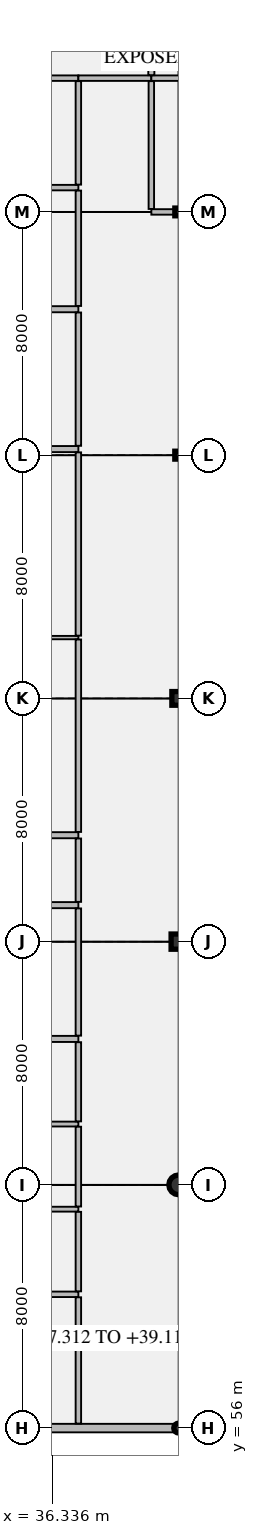
"""IFC4 building model, lengths in metres.
Left out: names, types, materials, properties, quantities, classifications, styles, units other than length and angle.
Written with IfcOpenShell. Run it as: python <this file> out.ifc"""

import sys

from ifc_helpers import new_model, si_unit, direction, frame, frame_2d, origin, origin_2d, place, context, subcontext, project, spatial, rectangle, hollow_rectangle, circle, hollow_circle, i_section, extrude, element, fill, save


model = new_model("IFC4")
c1 = context("Model", 3, precision=1e-05, world=origin(), true_north=direction((0.0, 1.0)))
c2 = subcontext(c1, "Body", "Model", "MODEL_VIEW")
j1 = project(units=[si_unit("LENGTHUNIT", "METRE"), si_unit("PLANEANGLEUNIT", "RADIAN")], contexts=[c1])
p1 = place(None, origin())
s1 = spatial("IfcSite", under=j1, at=p1, CompositionType="ELEMENT")
p2 = place(p1, origin())
s2 = spatial("IfcBuilding", under=s1, at=p2, CompositionType="ELEMENT")
p3 = place(p2, frame((0.0, 0.0, 33.3)))
s3 = spatial("IfcBuildingStorey", under=s2, at=p3, CompositionType="ELEMENT", Elevation=33.3)
p4 = place(p3, frame((40.5, 56.0, 0.0), z_axis=(0.0, 0.0, 1.0), x_axis=(1.0, 0.0, 0.0)))
e1 = element("IfcColumn", 1, at=p4, inside=s3, PredefinedType="COLUMN", context=c2, shape_type="SweptSolid", body=[
    extrude(hollow_circle(Radius=0.162, WallThickness=0.013, at=origin_2d()), origin(), (0.0, 0.0, 1.0), 3.98),
])
p5 = place(p3, frame((40.5, 64.0, 0.0), z_axis=(0.0, 0.0, 1.0), x_axis=(1.0, 0.0, 0.0)))
e2 = element("IfcColumn", 2, at=p5, inside=s3, PredefinedType="COLUMN", context=c2, shape_type="SweptSolid", body=[
    extrude(circle(Radius=0.325, at=origin_2d()), origin(), (0.0, 0.0, 1.0), 3.98),
])
p6 = place(p3, frame((40.5, 72.0, 0.0), z_axis=(0.0, 0.0, 1.0), x_axis=(1.0, 0.0, 0.0)))
e3 = element("IfcColumn", 3, at=p6, inside=s3, PredefinedType="COLUMN", context=c2, shape_type="SweptSolid", body=[
    extrude(rectangle(XDim=0.5, YDim=0.5, at=origin_2d()), origin(), (0.0, 0.0, 1.0), 3.98),
])
p7 = place(p3, frame((40.5, 80.0, 0.0), z_axis=(0.0, 0.0, 1.0), x_axis=(1.0, 0.0, 0.0)))
e4 = element("IfcColumn", 4, at=p7, inside=s3, PredefinedType="COLUMN", context=c2, shape_type="SweptSolid", body=[
    extrude(rectangle(XDim=0.45, YDim=0.45, at=origin_2d()), origin(), (0.0, 0.0, 1.0), 3.98),
])
p8 = place(p3, frame((40.5, 88.0, 0.0), z_axis=(0.0, 0.0, 1.0), x_axis=(1.0, 0.0, 0.0)))
e5 = element("IfcColumn", 5, at=p8, inside=s3, PredefinedType="COLUMN", context=c2, shape_type="SweptSolid", body=[
    extrude(i_section(OverallWidth=0.256, OverallDepth=0.26, WebThickness=0.011, FlangeThickness=0.017, FilletRadius=0.013, at=origin_2d()), origin(), (0.0, 0.0, 1.0), 3.98),
])
p9 = place(p3, frame((40.5, 96.0, 0.0), z_axis=(0.0, 0.0, 1.0), x_axis=(1.0, 0.0, 0.0)))
e6 = element("IfcColumn", 6, at=p9, inside=s3, PredefinedType="COLUMN", context=c2, shape_type="SweptSolid", body=[
    extrude(hollow_rectangle(XDim=0.254, YDim=0.254, WallThickness=0.013, InnerFilletRadius=0.013, OuterFilletRadius=0.025, at=origin_2d()), origin(), (0.0, 0.0, 1.0), 3.98),
])
p10 = place(p3, frame((28.26, 56.0, 0.0), z_axis=(0.0, 0.0, 1.0), x_axis=(1.0, 0.0, 0.0)))
e7 = element("IfcWall", 7, at=p10, inside=s3, PredefinedType="SOLIDWALL", context=c2, shape_type="SweptSolid", body=[
    extrude(rectangle(XDim=12.06, YDim=0.28, at=frame_2d((6.03, 0.0))), origin(), (0.0, 0.0, 1.0), 3.655),
])
for number, where, z_axis, x_axis in (
    (8, (30.249, 73.2, 0.0), (0.0, 0.0, 1.0), (1.0, 0.0, 0.0)),
    (9, (30.249, 75.5, 0.0), (0.0, 0.0, 1.0), (1.0, 0.0, 0.0)),
):
    element("IfcWall", number, at=place(p3, frame(where, z_axis=z_axis, x_axis=x_axis)), inside=s3, PredefinedType="PARTITIONING", context=c2, shape_type="SweptSolid", body=[
        extrude(rectangle(XDim=6.951, YDim=0.2, at=frame_2d((3.475, 0.0))), origin(), (0.0, 0.0, 1.0), 3.98),
    ])
p11 = place(p3, frame((30.249, 82.0, 0.0), z_axis=(0.0, 0.0, 1.0), x_axis=(1.0, 0.0, 0.0)))
e10 = element("IfcWall", 10, at=p11, inside=s3, PredefinedType="PARTITIONING", context=c2, shape_type="SweptSolid", body=[
    extrude(rectangle(XDim=6.951, YDim=0.11, at=frame_2d((3.475, 0.0))), origin(), (0.0, 0.0, 1.0), 3.98),
])
p12 = place(p3, frame((32.658, 88.2, 0.0), z_axis=(0.0, 0.0, 1.0), x_axis=(1.0, 0.0, 0.0)))
e11 = element("IfcWall", 11, at=p12, inside=s3, PredefinedType="PARTITIONING", context=c2, shape_type="SweptSolid", body=[
    extrude(rectangle(XDim=4.542, YDim=0.2, at=frame_2d((2.271, 0.0))), origin(), (0.0, 0.0, 1.0), 3.655),
])
p13 = place(p3, frame((30.249, 92.8, 0.0), z_axis=(0.0, 0.0, 1.0), x_axis=(1.0, 0.0, 0.0)))
e12 = element("IfcWall", 12, at=p13, inside=s3, PredefinedType="PARTITIONING", context=c2, shape_type="SweptSolid", body=[
    extrude(rectangle(XDim=6.951, YDim=0.2, at=frame_2d((3.475, 0.0))), origin(), (0.0, 0.0, 1.0), 3.98),
])
p14 = place(p3, frame((29.2, 96.8, 0.0), z_axis=(0.0, 0.0, 1.0), x_axis=(1.0, 0.0, 0.0)))
e13 = element("IfcWall", 13, at=p14, inside=s3, PredefinedType="PARTITIONING", context=c2, shape_type="SweptSolid", body=[
    extrude(rectangle(XDim=8.0, YDim=0.18, at=frame_2d((4.0, 0.0))), origin(), (0.0, 0.0, 1.0), 3.98),
])
p15 = place(p3, frame((29.425, 100.4, 0.0), z_axis=(0.0, 0.0, 1.0), x_axis=(1.0, 0.0, 0.0)))
e14 = element("IfcWall", 14, at=p15, inside=s3, PredefinedType="PARTITIONING", context=c2, shape_type="SweptSolid", body=[
    extrude(rectangle(XDim=7.775, YDim=0.18, at=frame_2d((3.887, 0.0))), origin(), (0.0, 0.0, 1.0), 3.98),
])
p16 = place(p15, frame((3.387, 0.0, 0.0)))
e15 = element("IfcOpeningElement", 15, at=p16, cuts=e14, PredefinedType="OPENING", context=c2, shape_type="SweptSolid", body=[
    extrude(rectangle(XDim=1.0, YDim=2.2, at=frame_2d((0.5, 1.1))), frame((0.0, 0.1, 0.0), z_axis=(0.0, -1.0, 0.0), x_axis=(1.0, 0.0, 0.0)), (0.0, 0.0, 1.0), 0.2),
])
p17 = place(p3, frame((32.025, 60.4, 0.0), z_axis=(0.0, 0.0, 1.0), x_axis=(1.0, 0.0, 0.0)))
e16 = element("IfcWall", 16, at=p17, inside=s3, PredefinedType="PARTITIONING", context=c2, shape_type="SweptSolid", body=[
    extrude(rectangle(XDim=5.175, YDim=0.18, at=frame_2d((2.587, 0.0))), origin(), (0.0, 0.0, 1.0), 3.98),
])
for number, where, z_axis, x_axis in (
    (17, (32.033, 63.2, 0.0), (0.0, 0.0, 1.0), (1.0, 0.0, 0.0)),
    (18, (32.033, 66.0, 0.0), (0.0, 0.0, 1.0), (1.0, 0.0, 0.0)),
):
    element("IfcWall", number, at=place(p3, frame(where, z_axis=z_axis, x_axis=x_axis)), inside=s3, PredefinedType="PARTITIONING", context=c2, shape_type="SweptSolid", body=[
        extrude(rectangle(XDim=5.167, YDim=0.16, at=frame_2d((2.583, 0.0))), origin(), (0.0, 0.0, 1.0), 3.98),
    ])
p18 = place(p3, frame((32.025, 68.8, 0.0), z_axis=(0.0, 0.0, 1.0), x_axis=(1.0, 0.0, 0.0)))
e19 = element("IfcWall", 19, at=p18, inside=s3, PredefinedType="PARTITIONING", context=c2, shape_type="SweptSolid", body=[
    extrude(rectangle(XDim=5.175, YDim=0.2, at=frame_2d((2.587, 0.0))), origin(), (0.0, 0.0, 1.0), 3.98),
])
p19 = place(p3, frame((37.2, 100.4, 0.0), z_axis=(0.0, 0.0, 1.0), x_axis=(1.0, 0.0, 0.0)))
e20 = element("IfcWall", 20, at=p19, inside=s3, PredefinedType="PARTITIONING", context=c2, shape_type="SweptSolid", body=[
    extrude(rectangle(XDim=2.4, YDim=0.18, at=frame_2d((1.2, 0.0))), origin(), (0.0, 0.0, 1.0), 3.98),
])
p20 = place(p3, frame((39.6, 96.0, 0.0), z_axis=(0.0, 0.0, 1.0), x_axis=(1.0, 0.0, 0.0)))
e21 = element("IfcWall", 21, at=p20, inside=s3, PredefinedType="PARTITIONING", context=c2, shape_type="SweptSolid", body=[
    extrude(rectangle(XDim=0.765, YDim=0.18, at=frame_2d((0.382, 0.0))), origin(), (0.0, 0.0, 1.0), 3.655),
])
p21 = place(p3, frame((39.6, 100.4, 0.0), z_axis=(0.0, 0.0, 1.0), x_axis=(1.0, 0.0, 0.0)))
e22 = element("IfcWall", 22, at=p21, inside=s3, PredefinedType="PARTITIONING", context=c2, shape_type="SweptSolid", body=[
    extrude(rectangle(XDim=4.0, YDim=0.18, at=frame_2d((2.0, 0.0))), origin(), (0.0, 0.0, 1.0), 3.98),
])
p22 = place(p3, frame((37.2, 56.148, 0.0), z_axis=(0.0, 0.0, 1.0), x_axis=(0.0, 1.0, 0.0)))
e23 = element("IfcWall", 23, at=p22, inside=s3, PredefinedType="PARTITIONING", context=c2, shape_type="SweptSolid", body=[
    extrude(rectangle(XDim=4.154, YDim=0.18, at=frame_2d((2.077, 0.0))), origin(), (0.0, 0.0, 1.0), 3.98),
])
p23 = place(p22, frame((1.527, 0.0, 0.0)))
e24 = element("IfcOpeningElement", 24, at=p23, cuts=e23, PredefinedType="OPENING", context=c2, shape_type="SweptSolid", body=[
    extrude(rectangle(XDim=1.1, YDim=2.2, at=frame_2d((0.55, 1.1))), frame((0.0, 0.1, 0.0), z_axis=(0.0, -1.0, 0.0), x_axis=(1.0, 0.0, 0.0)), (0.0, 0.0, 1.0), 0.2),
])
p24 = place(p3, frame((37.2, 60.498, 0.0), z_axis=(0.0, 0.0, 1.0), x_axis=(0.0, 1.0, 0.0)))
e25 = element("IfcWall", 25, at=p24, inside=s3, PredefinedType="PARTITIONING", context=c2, shape_type="SweptSolid", body=[
    extrude(rectangle(XDim=2.614, YDim=0.18, at=frame_2d((1.307, 0.0))), origin(), (0.0, 0.0, 1.0), 3.98),
])
p25 = place(p24, frame((0.832, 0.0, 0.0)))
e26 = element("IfcOpeningElement", 26, at=p25, cuts=e25, PredefinedType="OPENING", context=c2, shape_type="SweptSolid", body=[
    extrude(rectangle(XDim=0.95, YDim=2.1, at=frame_2d((0.475, 1.05))), frame((0.0, 0.1, 0.0), z_axis=(0.0, -1.0, 0.0), x_axis=(1.0, 0.0, 0.0)), (0.0, 0.0, 1.0), 0.2),
])
p26 = place(p3, frame((37.2, 63.288, 0.0), z_axis=(0.0, 0.0, 1.0), x_axis=(0.0, 1.0, 0.0)))
e27 = element("IfcWall", 27, at=p26, inside=s3, PredefinedType="PARTITIONING", context=c2, shape_type="SweptSolid", body=[
    extrude(rectangle(XDim=2.624, YDim=0.18, at=frame_2d((1.312, 0.0))), origin(), (0.0, 0.0, 1.0), 3.98),
])
p27 = place(p26, frame((0.837, 0.0, 0.0)))
e28 = element("IfcOpeningElement", 28, at=p27, cuts=e27, PredefinedType="OPENING", context=c2, shape_type="SweptSolid", body=[
    extrude(rectangle(XDim=0.95, YDim=2.1, at=frame_2d((0.475, 1.05))), frame((0.0, 0.1, 0.0), z_axis=(0.0, -1.0, 0.0), x_axis=(1.0, 0.0, 0.0)), (0.0, 0.0, 1.0), 0.2),
])
p28 = place(p3, frame((37.2, 66.088, 0.0), z_axis=(0.0, 0.0, 1.0), x_axis=(0.0, 1.0, 0.0)))
e29 = element("IfcWall", 29, at=p28, inside=s3, PredefinedType="PARTITIONING", context=c2, shape_type="SweptSolid", body=[
    extrude(rectangle(XDim=2.604, YDim=0.18, at=frame_2d((1.302, 0.0))), origin(), (0.0, 0.0, 1.0), 3.98),
])
p29 = place(p28, frame((0.802, 0.0, 0.0)))
e30 = element("IfcOpeningElement", 30, at=p29, cuts=e29, PredefinedType="OPENING", context=c2, shape_type="SweptSolid", body=[
    extrude(rectangle(XDim=1.0, YDim=2.15, at=frame_2d((0.5, 1.075))), frame((0.0, 0.1, 0.0), z_axis=(0.0, -1.0, 0.0), x_axis=(1.0, 0.0, 0.0)), (0.0, 0.0, 1.0), 0.2),
])
p30 = place(p3, frame((37.2, 68.908, 0.0), z_axis=(0.0, 0.0, 1.0), x_axis=(0.0, 1.0, 0.0)))
e31 = element("IfcWall", 31, at=p30, inside=s3, PredefinedType="PARTITIONING", context=c2, shape_type="SweptSolid", body=[
    extrude(rectangle(XDim=4.184, YDim=0.18, at=frame_2d((2.092, 0.0))), origin(), (0.0, 0.0, 1.0), 3.98),
])
p31 = place(p30, frame((1.542, 0.0, 0.0)))
e32 = element("IfcOpeningElement", 32, at=p31, cuts=e31, PredefinedType="OPENING", context=c2, shape_type="SweptSolid", body=[
    extrude(rectangle(XDim=1.1, YDim=2.2, at=frame_2d((0.55, 1.1))), frame((0.0, 0.1, 0.0), z_axis=(0.0, -1.0, 0.0), x_axis=(1.0, 0.0, 0.0)), (0.0, 0.0, 1.0), 0.2),
])
p32 = place(p3, frame((37.2, 73.308, 0.0), z_axis=(0.0, 0.0, 1.0), x_axis=(0.0, 1.0, 0.0)))
e33 = element("IfcWall", 33, at=p32, inside=s3, PredefinedType="PARTITIONING", context=c2, shape_type="SweptSolid", body=[
    extrude(rectangle(XDim=2.084, YDim=0.18, at=frame_2d((1.042, 0.0))), origin(), (0.0, 0.0, 1.0), 3.98),
])
p33 = place(p32, frame((0.492, 0.0, 0.0)))
e34 = element("IfcOpeningElement", 34, at=p33, cuts=e33, PredefinedType="OPENING", context=c2, shape_type="SweptSolid", body=[
    extrude(rectangle(XDim=1.1, YDim=2.2, at=frame_2d((0.55, 1.1))), frame((0.0, 0.1, 0.0), z_axis=(0.0, -1.0, 0.0), x_axis=(1.0, 0.0, 0.0)), (0.0, 0.0, 1.0), 0.2),
])
p34 = place(p3, frame((37.2, 75.608, 0.0), z_axis=(0.0, 0.0, 1.0), x_axis=(0.0, 1.0, 0.0)))
e35 = element("IfcWall", 35, at=p34, inside=s3, PredefinedType="PARTITIONING", context=c2, shape_type="SweptSolid", body=[
    extrude(rectangle(XDim=6.329, YDim=0.18, at=frame_2d((3.165, 0.0))), origin(), (0.0, 0.0, 1.0), 3.98),
])
p35 = place(p34, frame((2.665, 0.0, 0.0)))
e36 = element("IfcOpeningElement", 36, at=p35, cuts=e35, PredefinedType="OPENING", context=c2, shape_type="SweptSolid", body=[
    extrude(rectangle(XDim=1.0, YDim=2.2, at=frame_2d((0.5, 1.1))), frame((0.0, 0.1, 0.0), z_axis=(0.0, -1.0, 0.0), x_axis=(1.0, 0.0, 0.0)), (0.0, 0.0, 1.0), 0.2),
])
p36 = place(p3, frame((37.2, 82.063, 0.0), z_axis=(0.0, 0.0, 1.0), x_axis=(0.0, 1.0, 0.0)))
e37 = element("IfcWall", 37, at=p36, inside=s3, PredefinedType="PARTITIONING", context=c2, shape_type="SweptSolid", body=[
    extrude(rectangle(XDim=6.029, YDim=0.18, at=frame_2d((3.015, 0.0))), origin(), (0.0, 0.0, 1.0), 3.98),
])
p37 = place(p36, frame((2.514, 0.0, 0.0)))
e38 = element("IfcOpeningElement", 38, at=p37, cuts=e37, PredefinedType="OPENING", context=c2, shape_type="SweptSolid", body=[
    extrude(rectangle(XDim=1.0, YDim=2.2, at=frame_2d((0.5, 1.1))), frame((0.0, 0.1, 0.0), z_axis=(0.0, -1.0, 0.0), x_axis=(1.0, 0.0, 0.0)), (0.0, 0.0, 1.0), 0.2),
])
p38 = place(p3, frame((37.2, 88.308, 0.0), z_axis=(0.0, 0.0, 1.0), x_axis=(0.0, 1.0, 0.0)))
e39 = element("IfcWall", 39, at=p38, inside=s3, PredefinedType="PARTITIONING", context=c2, shape_type="SweptSolid", body=[
    extrude(rectangle(XDim=4.384, YDim=0.18, at=frame_2d((2.192, 0.0))), origin(), (0.0, 0.0, 1.0), 3.98),
])
p39 = place(p38, frame((1.642, 0.0, 0.0)))
e40 = element("IfcOpeningElement", 40, at=p39, cuts=e39, PredefinedType="OPENING", context=c2, shape_type="SweptSolid", body=[
    extrude(rectangle(XDim=1.1, YDim=2.2, at=frame_2d((0.55, 1.1))), frame((0.0, 0.1, 0.0), z_axis=(0.0, -1.0, 0.0), x_axis=(1.0, 0.0, 0.0)), (0.0, 0.0, 1.0), 0.2),
])
p40 = place(p3, frame((37.2, 92.908, 0.0), z_axis=(0.0, 0.0, 1.0), x_axis=(0.0, 1.0, 0.0)))
e41 = element("IfcWall", 41, at=p40, inside=s3, PredefinedType="PARTITIONING", context=c2, shape_type="SweptSolid", body=[
    extrude(rectangle(XDim=3.794, YDim=0.18, at=frame_2d((1.897, 0.0))), origin(), (0.0, 0.0, 1.0), 3.98),
])
p41 = place(p40, frame((1.397, 0.0, 0.0)))
e42 = element("IfcOpeningElement", 42, at=p41, cuts=e41, PredefinedType="OPENING", context=c2, shape_type="SweptSolid", body=[
    extrude(rectangle(XDim=1.0, YDim=2.2, at=frame_2d((0.5, 1.1))), frame((0.0, 0.1, 0.0), z_axis=(0.0, -1.0, 0.0), x_axis=(1.0, 0.0, 0.0)), (0.0, 0.0, 1.0), 0.2),
])
p42 = place(p3, frame((37.2, 96.898, 0.0), z_axis=(0.0, 0.0, 1.0), x_axis=(0.0, 1.0, 0.0)))
e43 = element("IfcWall", 43, at=p42, inside=s3, PredefinedType="PARTITIONING", context=c2, shape_type="SweptSolid", body=[
    extrude(rectangle(XDim=3.404, YDim=0.18, at=frame_2d((1.702, 0.0))), origin(), (0.0, 0.0, 1.0), 3.98),
])
p43 = place(p42, frame((1.152, 0.0, 0.0)))
e44 = element("IfcOpeningElement", 44, at=p43, cuts=e43, PredefinedType="OPENING", context=c2, shape_type="SweptSolid", body=[
    extrude(rectangle(XDim=1.1, YDim=2.2, at=frame_2d((0.55, 1.1))), frame((0.0, 0.1, 0.0), z_axis=(0.0, -1.0, 0.0), x_axis=(1.0, 0.0, 0.0)), (0.0, 0.0, 1.0), 0.2),
])
p44 = place(p3, frame((39.6, 96.098, 0.0), z_axis=(0.0, 0.0, 1.0), x_axis=(0.0, 1.0, 0.0)))
e45 = element("IfcWall", 45, at=p44, inside=s3, PredefinedType="PARTITIONING", context=c2, shape_type="SweptSolid", body=[
    extrude(rectangle(XDim=4.204, YDim=0.18, at=frame_2d((2.102, 0.0))), origin(), (0.0, 0.0, 1.0), 3.98),
])
p45 = place(p44, frame((1.552, 0.0, 0.0)))
e46 = element("IfcOpeningElement", 46, at=p45, cuts=e45, PredefinedType="OPENING", context=c2, shape_type="SweptSolid", body=[
    extrude(rectangle(XDim=1.1, YDim=2.2, at=frame_2d((0.55, 1.1))), frame((0.0, 0.1, 0.0), z_axis=(0.0, -1.0, 0.0), x_axis=(1.0, 0.0, 0.0)), (0.0, 0.0, 1.0), 0.2),
])
p46 = place(p3, frame((39.6, 100.498, 0.0), z_axis=(0.0, 0.0, 1.0), x_axis=(0.0, 1.0, 0.0)))
e47 = element("IfcWall", 47, at=p46, inside=s3, PredefinedType="PARTITIONING", context=c2, shape_type="SweptSolid", body=[
    extrude(rectangle(XDim=8.204, YDim=0.2, at=frame_2d((4.102, 0.0))), origin(), (0.0, 0.0, 1.0), 3.98),
])
p47 = place(p23, origin())
e48 = element("IfcDoor", 48, at=p47, inside=s3, OperationType="SINGLE_SWING_RIGHT", PredefinedType="DOOR", context=c2, shape_type="SweptSolid", body=[
    extrude(rectangle(XDim=1.1, YDim=2.2, at=frame_2d((0.55, 1.1))), frame((0.0, 0.025, 0.0), z_axis=(0.0, -1.0, 0.0), x_axis=(1.0, 0.0, 0.0)), (0.0, 0.0, 1.0), 0.05),
])
fill(e24, e48)
p48 = place(p25, origin())
e49 = element("IfcDoor", 49, at=p48, inside=s3, OperationType="SINGLE_SWING_LEFT", PredefinedType="DOOR", context=c2, shape_type="SweptSolid", body=[
    extrude(rectangle(XDim=0.95, YDim=2.1, at=frame_2d((0.475, 1.05))), frame((0.0, 0.025, 0.0), z_axis=(0.0, -1.0, 0.0), x_axis=(1.0, 0.0, 0.0)), (0.0, 0.0, 1.0), 0.05),
])
fill(e26, e49)
p49 = place(p27, origin())
e50 = element("IfcDoor", 50, at=p49, inside=s3, OperationType="SINGLE_SWING_RIGHT", PredefinedType="DOOR", context=c2, shape_type="SweptSolid", body=[
    extrude(rectangle(XDim=0.95, YDim=2.1, at=frame_2d((0.475, 1.05))), frame((0.0, 0.025, 0.0), z_axis=(0.0, -1.0, 0.0), x_axis=(1.0, 0.0, 0.0)), (0.0, 0.0, 1.0), 0.05),
])
fill(e28, e50)
p50 = place(p29, origin())
e51 = element("IfcDoor", 51, at=p50, inside=s3, OperationType="SINGLE_SWING_LEFT", PredefinedType="DOOR", context=c2, shape_type="SweptSolid", body=[
    extrude(rectangle(XDim=1.0, YDim=2.15, at=frame_2d((0.5, 1.075))), frame((0.0, 0.025, 0.0), z_axis=(0.0, -1.0, 0.0), x_axis=(1.0, 0.0, 0.0)), (0.0, 0.0, 1.0), 0.05),
])
fill(e30, e51)
p51 = place(p31, origin())
e52 = element("IfcDoor", 52, at=p51, inside=s3, OperationType="SINGLE_SWING_RIGHT", PredefinedType="DOOR", context=c2, shape_type="SweptSolid", body=[
    extrude(rectangle(XDim=1.1, YDim=2.2, at=frame_2d((0.55, 1.1))), frame((0.0, 0.025, 0.0), z_axis=(0.0, -1.0, 0.0), x_axis=(1.0, 0.0, 0.0)), (0.0, 0.0, 1.0), 0.05),
])
fill(e32, e52)
p52 = place(p33, origin())
e53 = element("IfcDoor", 53, at=p52, inside=s3, OperationType="SINGLE_SWING_LEFT", PredefinedType="DOOR", context=c2, shape_type="SweptSolid", body=[
    extrude(rectangle(XDim=1.1, YDim=2.2, at=frame_2d((0.55, 1.1))), frame((0.0, 0.025, 0.0), z_axis=(0.0, -1.0, 0.0), x_axis=(1.0, 0.0, 0.0)), (0.0, 0.0, 1.0), 0.05),
])
fill(e34, e53)
p53 = place(p35, origin())
e54 = element("IfcDoor", 54, at=p53, inside=s3, OperationType="SINGLE_SWING_RIGHT", PredefinedType="DOOR", context=c2, shape_type="SweptSolid", body=[
    extrude(rectangle(XDim=1.0, YDim=2.2, at=frame_2d((0.5, 1.1))), frame((0.0, 0.025, 0.0), z_axis=(0.0, -1.0, 0.0), x_axis=(1.0, 0.0, 0.0)), (0.0, 0.0, 1.0), 0.05),
])
fill(e36, e54)
p54 = place(p37, origin())
e55 = element("IfcDoor", 55, at=p54, inside=s3, OperationType="SINGLE_SWING_LEFT", PredefinedType="DOOR", context=c2, shape_type="SweptSolid", body=[
    extrude(rectangle(XDim=1.0, YDim=2.2, at=frame_2d((0.5, 1.1))), frame((0.0, 0.025, 0.0), z_axis=(0.0, -1.0, 0.0), x_axis=(1.0, 0.0, 0.0)), (0.0, 0.0, 1.0), 0.05),
])
fill(e38, e55)
p55 = place(p39, origin())
e56 = element("IfcDoor", 56, at=p55, inside=s3, OperationType="SINGLE_SWING_RIGHT", PredefinedType="DOOR", context=c2, shape_type="SweptSolid", body=[
    extrude(rectangle(XDim=1.1, YDim=2.2, at=frame_2d((0.55, 1.1))), frame((0.0, 0.025, 0.0), z_axis=(0.0, -1.0, 0.0), x_axis=(1.0, 0.0, 0.0)), (0.0, 0.0, 1.0), 0.05),
])
fill(e40, e56)
p56 = place(p41, origin())
e57 = element("IfcDoor", 57, at=p56, inside=s3, OperationType="SINGLE_SWING_LEFT", PredefinedType="DOOR", context=c2, shape_type="SweptSolid", body=[
    extrude(rectangle(XDim=1.0, YDim=2.2, at=frame_2d((0.5, 1.1))), frame((0.0, 0.025, 0.0), z_axis=(0.0, -1.0, 0.0), x_axis=(1.0, 0.0, 0.0)), (0.0, 0.0, 1.0), 0.05),
])
fill(e42, e57)
p57 = place(p43, origin())
e58 = element("IfcDoor", 58, at=p57, inside=s3, OperationType="SINGLE_SWING_RIGHT", PredefinedType="DOOR", context=c2, shape_type="SweptSolid", body=[
    extrude(rectangle(XDim=1.1, YDim=2.2, at=frame_2d((0.55, 1.1))), frame((0.0, 0.025, 0.0), z_axis=(0.0, -1.0, 0.0), x_axis=(1.0, 0.0, 0.0)), (0.0, 0.0, 1.0), 0.05),
])
fill(e44, e58)
p58 = place(p45, frame((1.1, 0.0, 0.0), z_axis=(0.0, 0.0, 1.0), x_axis=(-1.0, 0.0, 0.0)))
e59 = element("IfcDoor", 59, at=p58, inside=s3, OperationType="SINGLE_SWING_LEFT", PredefinedType="DOOR", context=c2, shape_type="SweptSolid", body=[
    extrude(rectangle(XDim=1.1, YDim=2.2, at=frame_2d((0.55, 1.1))), frame((0.0, 0.025, 0.0), z_axis=(0.0, -1.0, 0.0), x_axis=(1.0, 0.0, 0.0)), (0.0, 0.0, 1.0), 0.05),
])
fill(e46, e59)
save(model, sys.argv[1])
